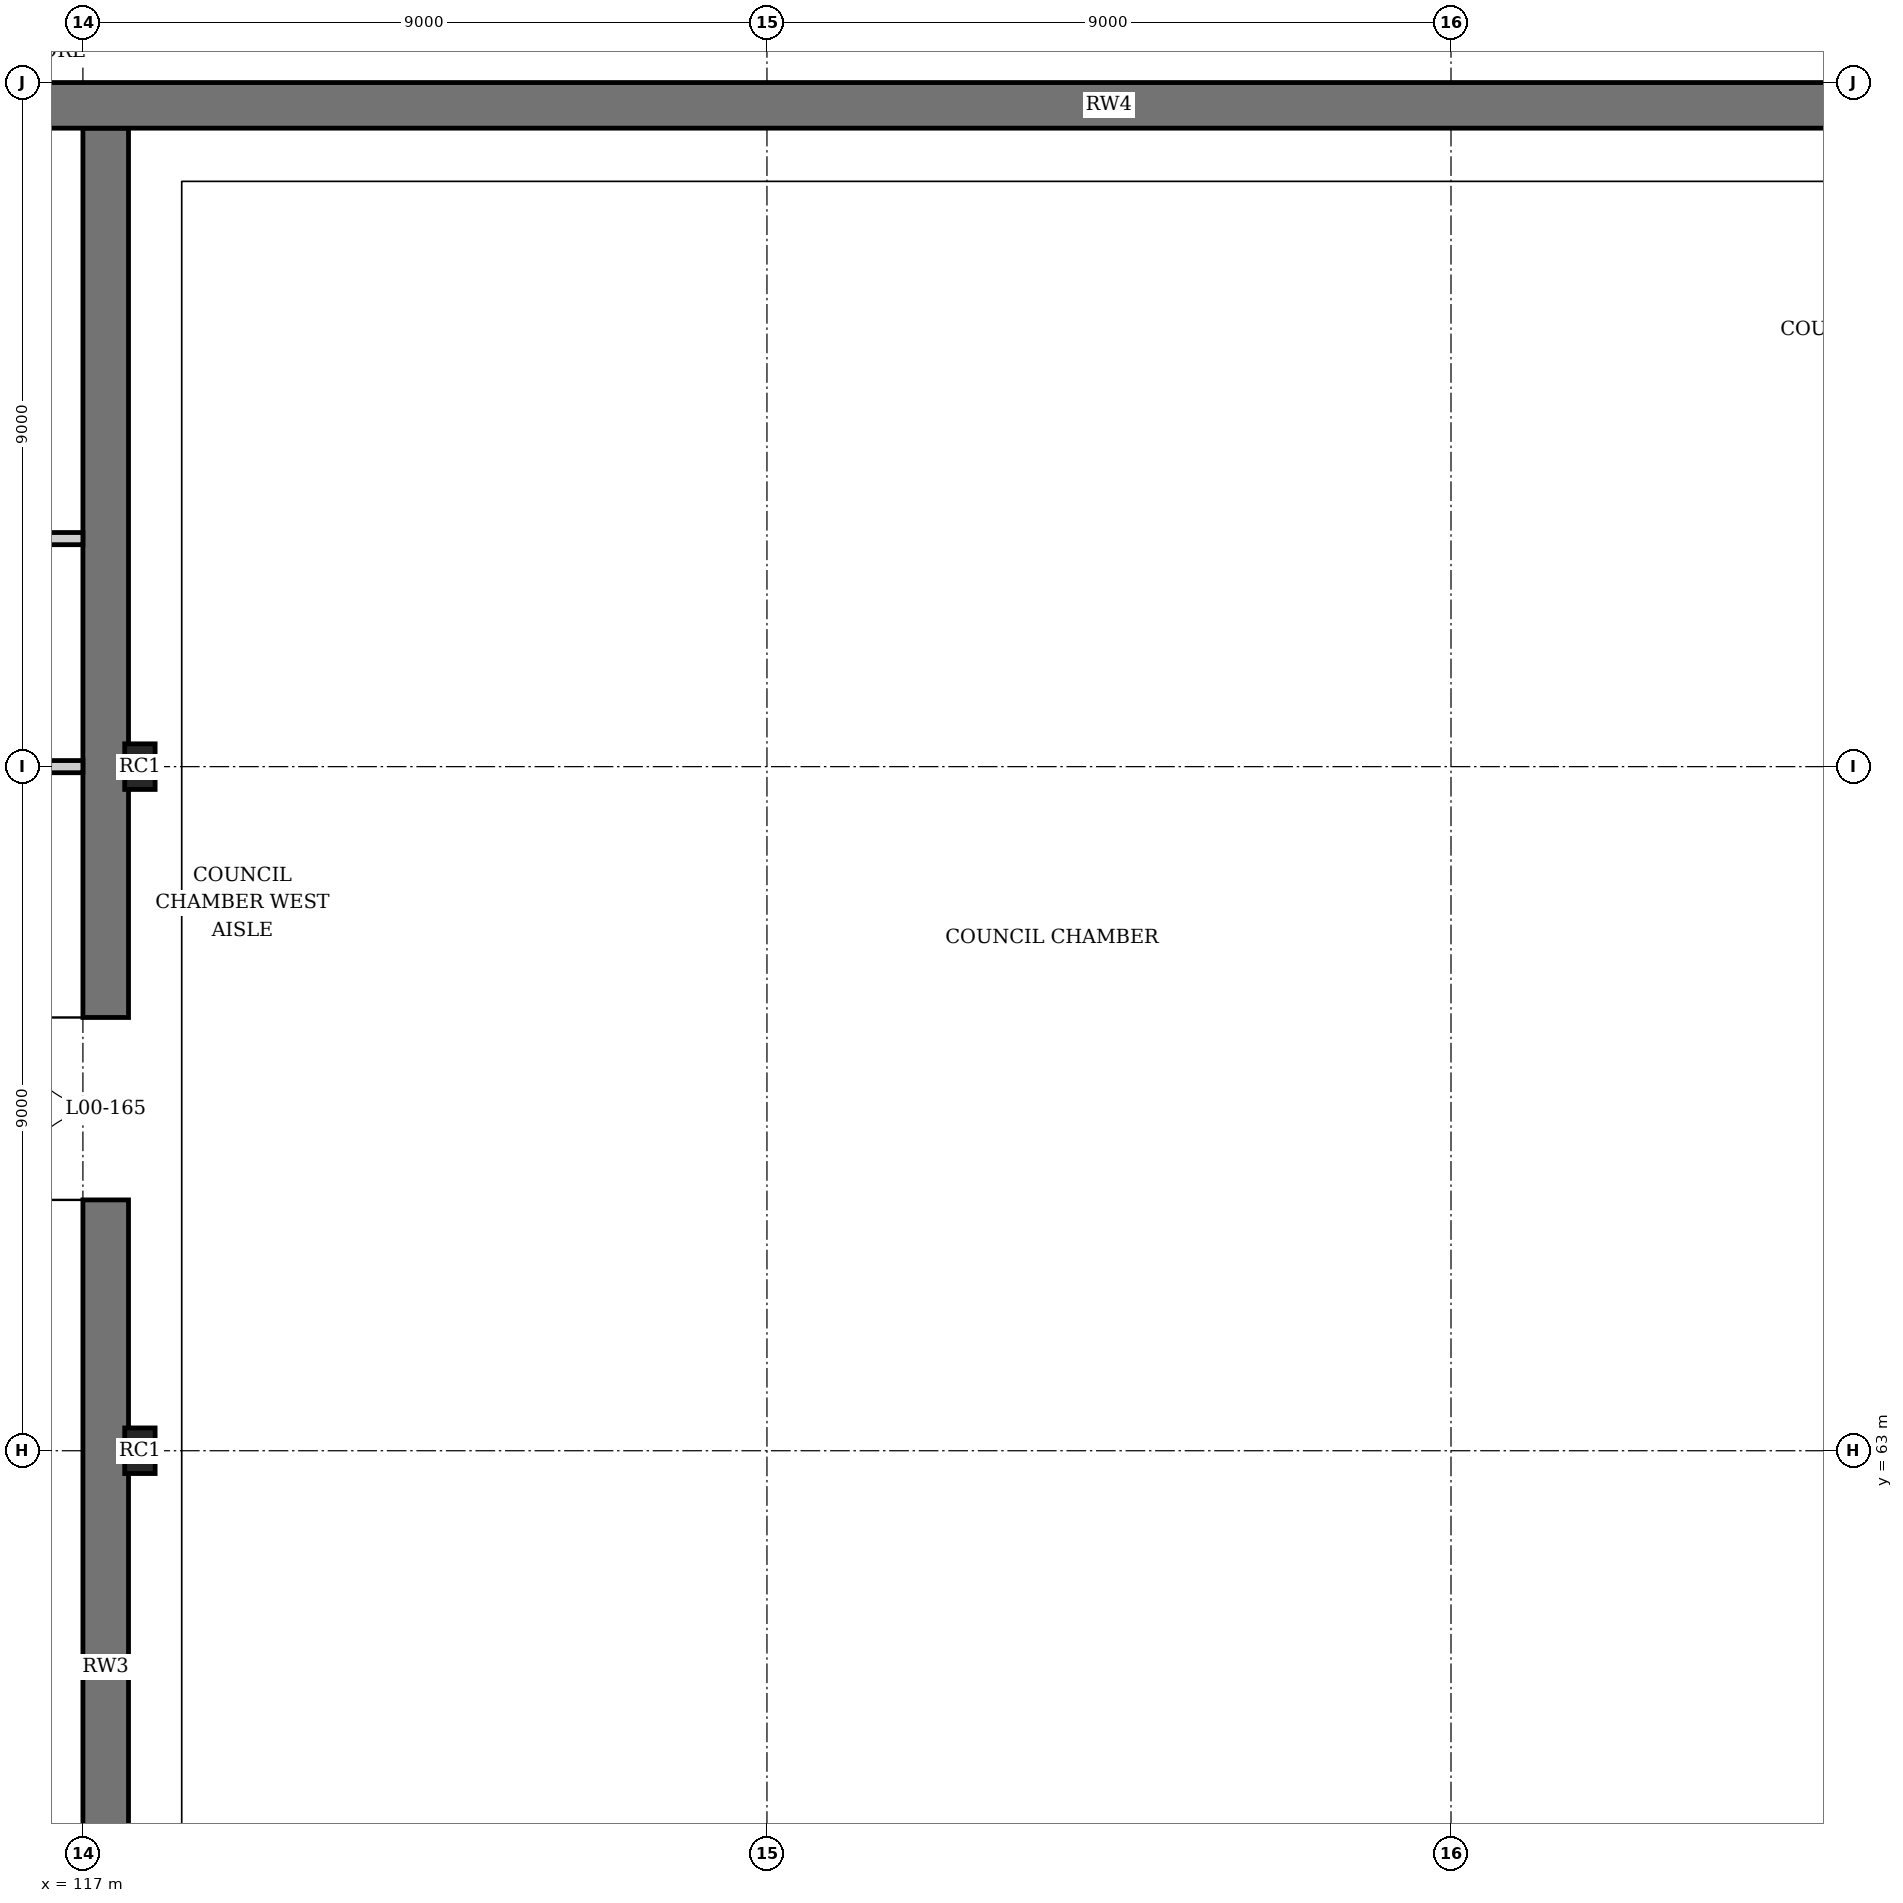
"""IFC4 building model, lengths in metres.
Left out: names, types, materials, properties, quantities, classifications, styles, units other than length and angle.
Written with IfcOpenShell. Run it as: python <this file> out.ifc"""

import sys

from ifc_helpers import new_model, si_unit, direction, frame, frame_2d, origin, origin_2d, place, context, subcontext, project, spatial, rectangle, extrude, element, fill, save


model = new_model("IFC4")
c1 = context("Model", 3, precision=1e-05, world=origin(), true_north=direction((0.0, 1.0)))
c2 = subcontext(c1, "Body", "Model", "MODEL_VIEW")
j1 = project(units=[si_unit("LENGTHUNIT", "METRE"), si_unit("PLANEANGLEUNIT", "RADIAN")], contexts=[c1])
p1 = place(None, origin())
s1 = spatial("IfcSite", under=j1, at=p1, CompositionType="ELEMENT")
p2 = place(p1, origin())
s2 = spatial("IfcBuilding", under=s1, at=p2, CompositionType="ELEMENT")
p3 = place(p2, origin())
s3 = spatial("IfcBuildingStorey", under=s2, at=p3, CompositionType="ELEMENT", Elevation=0.0)
p4 = place(p3, frame((117.3, 54.0, 0.0), z_axis=(0.0, 0.0, 1.0), x_axis=(0.0, 1.0, 0.0)))
e1 = element("IfcWall", 1, at=p4, inside=s3, PredefinedType="SHEAR", context=c2, shape_type="SweptSolid", body=[
    extrude(rectangle(XDim=26.4, YDim=0.6, at=frame_2d((13.2, 0.0))), origin(), (0.0, 0.0, 1.0), 6.0),
])
p5 = place(p4, frame((12.3, 0.0, 0.0)))
e2 = element("IfcOpeningElement", 2, at=p5, cuts=e1, PredefinedType="OPENING", context=c2, shape_type="SweptSolid", body=[
    extrude(rectangle(XDim=2.4, YDim=2.4, at=frame_2d((1.2, 1.2))), frame((0.0, 0.31, 0.0), z_axis=(0.0, -1.0, 0.0), x_axis=(1.0, 0.0, 0.0)), (0.0, 0.0, 1.0), 0.62),
])
for number, where, z_axis, x_axis in (
    (3, (117.75, 63.0, 0.0), (0.0, 0.0, 1.0), (0.0, 1.0, 0.0)),
    (4, (117.75, 72.0, 0.0), (0.0, 0.0, 1.0), (0.0, 1.0, 0.0)),
):
    element("IfcColumn", number, at=place(p3, frame(where, z_axis=z_axis, x_axis=x_axis)), inside=s3, PredefinedType="PILASTER", context=c2, shape_type="SweptSolid", body=[
        extrude(rectangle(XDim=0.6, YDim=0.4, at=origin_2d()), origin(), (0.0, 0.0, 1.0), 6.0),
    ])
p6 = place(p3, frame((0.0, 80.7, 0.0), z_axis=(0.0, 0.0, 1.0), x_axis=(1.0, 0.0, 0.0)))
e5 = element("IfcWall", 5, at=p6, inside=s3, PredefinedType="SHEAR", context=c2, shape_type="SweptSolid", body=[
    extrude(rectangle(XDim=180.0, YDim=0.6, at=frame_2d((90.0, 0.0))), origin(), (0.0, 0.0, 1.0), 6.0),
])
p7 = place(p6, frame((28.25, 0.0, 0.0)))
e6 = element("IfcOpeningElement", 6, at=p7, cuts=e5, PredefinedType="OPENING", context=c2, shape_type="SweptSolid", body=[
    extrude(rectangle(XDim=1.8, YDim=2.4, at=frame_2d((0.9, 1.2))), frame((0.0, 0.31, 0.0), z_axis=(0.0, -1.0, 0.0), x_axis=(1.0, 0.0, 0.0)), (0.0, 0.0, 1.0), 0.62),
])
p8 = place(p6, frame((82.25, 0.0, 0.0)))
e7 = element("IfcOpeningElement", 7, at=p8, cuts=e5, PredefinedType="OPENING", context=c2, shape_type="SweptSolid", body=[
    extrude(rectangle(XDim=1.8, YDim=2.4, at=frame_2d((0.9, 1.2))), frame((0.0, 0.31, 0.0), z_axis=(0.0, -1.0, 0.0), x_axis=(1.0, 0.0, 0.0)), (0.0, 0.0, 1.0), 0.62),
])
p9 = place(p6, frame((90.75, 0.0, 0.0)))
e8 = element("IfcOpeningElement", 8, at=p9, cuts=e5, PredefinedType="OPENING", context=c2, shape_type="SweptSolid", body=[
    extrude(rectangle(XDim=3.0, YDim=3.0, at=frame_2d((1.5, 1.5))), frame((0.0, 0.31, 0.0), z_axis=(0.0, -1.0, 0.0), x_axis=(1.0, 0.0, 0.0)), (0.0, 0.0, 1.0), 0.62),
])
p10 = place(p6, frame((95.25, 0.0, 0.0)))
e9 = element("IfcOpeningElement", 9, at=p10, cuts=e5, PredefinedType="OPENING", context=c2, shape_type="SweptSolid", body=[
    extrude(rectangle(XDim=3.0, YDim=3.0, at=frame_2d((1.5, 1.5))), frame((0.0, 0.31, 0.0), z_axis=(0.0, -1.0, 0.0), x_axis=(1.0, 0.0, 0.0)), (0.0, 0.0, 1.0), 0.62),
])
p11 = place(p6, frame((1.35, 0.0, 0.9)))
e10 = element("IfcOpeningElement", 10, at=p11, cuts=e5, PredefinedType="OPENING", context=c2, shape_type="SweptSolid", body=[
    extrude(rectangle(XDim=1.8, YDim=1.5, at=frame_2d((0.9, 0.75))), frame((0.0, 0.31, 0.0), z_axis=(0.0, -1.0, 0.0), x_axis=(1.0, 0.0, 0.0)), (0.0, 0.0, 1.0), 0.62),
])
p12 = place(p6, frame((5.85, 0.0, 0.9)))
e11 = element("IfcOpeningElement", 11, at=p12, cuts=e5, PredefinedType="OPENING", context=c2, shape_type="SweptSolid", body=[
    extrude(rectangle(XDim=1.8, YDim=1.5, at=frame_2d((0.9, 0.75))), frame((0.0, 0.31, 0.0), z_axis=(0.0, -1.0, 0.0), x_axis=(1.0, 0.0, 0.0)), (0.0, 0.0, 1.0), 0.62),
])
p13 = place(p6, frame((10.35, 0.0, 0.9)))
e12 = element("IfcOpeningElement", 12, at=p13, cuts=e5, PredefinedType="OPENING", context=c2, shape_type="SweptSolid", body=[
    extrude(rectangle(XDim=1.8, YDim=1.5, at=frame_2d((0.9, 0.75))), frame((0.0, 0.31, 0.0), z_axis=(0.0, -1.0, 0.0), x_axis=(1.0, 0.0, 0.0)), (0.0, 0.0, 1.0), 0.62),
])
p14 = place(p6, frame((14.85, 0.0, 0.9)))
e13 = element("IfcOpeningElement", 13, at=p14, cuts=e5, PredefinedType="OPENING", context=c2, shape_type="SweptSolid", body=[
    extrude(rectangle(XDim=1.8, YDim=1.5, at=frame_2d((0.9, 0.75))), frame((0.0, 0.31, 0.0), z_axis=(0.0, -1.0, 0.0), x_axis=(1.0, 0.0, 0.0)), (0.0, 0.0, 1.0), 0.62),
])
p15 = place(p6, frame((19.65, 0.0, 1.2)))
e14 = element("IfcOpeningElement", 14, at=p15, cuts=e5, PredefinedType="OPENING", context=c2, shape_type="SweptSolid", body=[
    extrude(rectangle(XDim=1.2, YDim=1.2, at=frame_2d((0.6, 0.6))), frame((0.0, 0.31, 0.0), z_axis=(0.0, -1.0, 0.0), x_axis=(1.0, 0.0, 0.0)), (0.0, 0.0, 1.0), 0.62),
])
p16 = place(p6, frame((24.15, 0.0, 1.2)))
e15 = element("IfcOpeningElement", 15, at=p16, cuts=e5, PredefinedType="OPENING", context=c2, shape_type="SweptSolid", body=[
    extrude(rectangle(XDim=1.2, YDim=1.2, at=frame_2d((0.6, 0.6))), frame((0.0, 0.31, 0.0), z_axis=(0.0, -1.0, 0.0), x_axis=(1.0, 0.0, 0.0)), (0.0, 0.0, 1.0), 0.62),
])
p17 = place(p6, frame((37.35, 0.0, 0.9)))
e16 = element("IfcOpeningElement", 16, at=p17, cuts=e5, PredefinedType="OPENING", context=c2, shape_type="SweptSolid", body=[
    extrude(rectangle(XDim=1.8, YDim=1.5, at=frame_2d((0.9, 0.75))), frame((0.0, 0.31, 0.0), z_axis=(0.0, -1.0, 0.0), x_axis=(1.0, 0.0, 0.0)), (0.0, 0.0, 1.0), 0.62),
])
p18 = place(p6, frame((41.85, 0.0, 0.9)))
e17 = element("IfcOpeningElement", 17, at=p18, cuts=e5, PredefinedType="OPENING", context=c2, shape_type="SweptSolid", body=[
    extrude(rectangle(XDim=1.8, YDim=1.5, at=frame_2d((0.9, 0.75))), frame((0.0, 0.31, 0.0), z_axis=(0.0, -1.0, 0.0), x_axis=(1.0, 0.0, 0.0)), (0.0, 0.0, 1.0), 0.62),
])
p19 = place(p6, frame((46.35, 0.0, 0.9)))
e18 = element("IfcOpeningElement", 18, at=p19, cuts=e5, PredefinedType="OPENING", context=c2, shape_type="SweptSolid", body=[
    extrude(rectangle(XDim=1.8, YDim=1.5, at=frame_2d((0.9, 0.75))), frame((0.0, 0.31, 0.0), z_axis=(0.0, -1.0, 0.0), x_axis=(1.0, 0.0, 0.0)), (0.0, 0.0, 1.0), 0.62),
])
p20 = place(p6, frame((50.85, 0.0, 0.9)))
e19 = element("IfcOpeningElement", 19, at=p20, cuts=e5, PredefinedType="OPENING", context=c2, shape_type="SweptSolid", body=[
    extrude(rectangle(XDim=1.8, YDim=1.5, at=frame_2d((0.9, 0.75))), frame((0.0, 0.31, 0.0), z_axis=(0.0, -1.0, 0.0), x_axis=(1.0, 0.0, 0.0)), (0.0, 0.0, 1.0), 0.62),
])
p21 = place(p6, frame((55.35, 0.0, 0.9)))
e20 = element("IfcOpeningElement", 20, at=p21, cuts=e5, PredefinedType="OPENING", context=c2, shape_type="SweptSolid", body=[
    extrude(rectangle(XDim=1.8, YDim=1.5, at=frame_2d((0.9, 0.75))), frame((0.0, 0.31, 0.0), z_axis=(0.0, -1.0, 0.0), x_axis=(1.0, 0.0, 0.0)), (0.0, 0.0, 1.0), 0.62),
])
p22 = place(p6, frame((59.85, 0.0, 0.9)))
e21 = element("IfcOpeningElement", 21, at=p22, cuts=e5, PredefinedType="OPENING", context=c2, shape_type="SweptSolid", body=[
    extrude(rectangle(XDim=1.8, YDim=1.5, at=frame_2d((0.9, 0.75))), frame((0.0, 0.31, 0.0), z_axis=(0.0, -1.0, 0.0), x_axis=(1.0, 0.0, 0.0)), (0.0, 0.0, 1.0), 0.62),
])
p23 = place(p6, frame((64.35, 0.0, 0.9)))
e22 = element("IfcOpeningElement", 22, at=p23, cuts=e5, PredefinedType="OPENING", context=c2, shape_type="SweptSolid", body=[
    extrude(rectangle(XDim=1.8, YDim=1.5, at=frame_2d((0.9, 0.75))), frame((0.0, 0.31, 0.0), z_axis=(0.0, -1.0, 0.0), x_axis=(1.0, 0.0, 0.0)), (0.0, 0.0, 1.0), 0.62),
])
p24 = place(p6, frame((68.85, 0.0, 0.9)))
e23 = element("IfcOpeningElement", 23, at=p24, cuts=e5, PredefinedType="OPENING", context=c2, shape_type="SweptSolid", body=[
    extrude(rectangle(XDim=1.8, YDim=1.5, at=frame_2d((0.9, 0.75))), frame((0.0, 0.31, 0.0), z_axis=(0.0, -1.0, 0.0), x_axis=(1.0, 0.0, 0.0)), (0.0, 0.0, 1.0), 0.62),
])
p25 = place(p6, frame((73.35, 0.0, 0.9)))
e24 = element("IfcOpeningElement", 24, at=p25, cuts=e5, PredefinedType="OPENING", context=c2, shape_type="SweptSolid", body=[
    extrude(rectangle(XDim=1.8, YDim=1.5, at=frame_2d((0.9, 0.75))), frame((0.0, 0.31, 0.0), z_axis=(0.0, -1.0, 0.0), x_axis=(1.0, 0.0, 0.0)), (0.0, 0.0, 1.0), 0.62),
])
p26 = place(p6, frame((77.85, 0.0, 0.9)))
e25 = element("IfcOpeningElement", 25, at=p26, cuts=e5, PredefinedType="OPENING", context=c2, shape_type="SweptSolid", body=[
    extrude(rectangle(XDim=1.8, YDim=1.5, at=frame_2d((0.9, 0.75))), frame((0.0, 0.31, 0.0), z_axis=(0.0, -1.0, 0.0), x_axis=(1.0, 0.0, 0.0)), (0.0, 0.0, 1.0), 0.62),
])
p27 = place(p6, frame((100.8, 0.0, 1.7)))
e26 = element("IfcOpeningElement", 26, at=p27, cuts=e5, PredefinedType="OPENING", context=c2, shape_type="SweptSolid", body=[
    extrude(rectangle(XDim=0.9, YDim=0.6, at=frame_2d((0.45, 0.3))), frame((0.0, 0.31, 0.0), z_axis=(0.0, -1.0, 0.0), x_axis=(1.0, 0.0, 0.0)), (0.0, 0.0, 1.0), 0.62),
])
p28 = place(p6, frame((105.3, 0.0, 1.7)))
e27 = element("IfcOpeningElement", 27, at=p28, cuts=e5, PredefinedType="OPENING", context=c2, shape_type="SweptSolid", body=[
    extrude(rectangle(XDim=0.9, YDim=0.6, at=frame_2d((0.45, 0.3))), frame((0.0, 0.31, 0.0), z_axis=(0.0, -1.0, 0.0), x_axis=(1.0, 0.0, 0.0)), (0.0, 0.0, 1.0), 0.62),
])
p29 = place(p6, frame((109.8, 0.0, 1.7)))
e28 = element("IfcOpeningElement", 28, at=p29, cuts=e5, PredefinedType="OPENING", context=c2, shape_type="SweptSolid", body=[
    extrude(rectangle(XDim=0.9, YDim=0.6, at=frame_2d((0.45, 0.3))), frame((0.0, 0.31, 0.0), z_axis=(0.0, -1.0, 0.0), x_axis=(1.0, 0.0, 0.0)), (0.0, 0.0, 1.0), 0.62),
])
p30 = place(p6, frame((154.65, 0.0, 1.2)))
e29 = element("IfcOpeningElement", 29, at=p30, cuts=e5, PredefinedType="OPENING", context=c2, shape_type="SweptSolid", body=[
    extrude(rectangle(XDim=1.2, YDim=1.2, at=frame_2d((0.6, 0.6))), frame((0.0, 0.31, 0.0), z_axis=(0.0, -1.0, 0.0), x_axis=(1.0, 0.0, 0.0)), (0.0, 0.0, 1.0), 0.62),
])
p31 = place(p6, frame((159.15, 0.0, 1.2)))
e30 = element("IfcOpeningElement", 30, at=p31, cuts=e5, PredefinedType="OPENING", context=c2, shape_type="SweptSolid", body=[
    extrude(rectangle(XDim=1.2, YDim=1.2, at=frame_2d((0.6, 0.6))), frame((0.0, 0.31, 0.0), z_axis=(0.0, -1.0, 0.0), x_axis=(1.0, 0.0, 0.0)), (0.0, 0.0, 1.0), 0.62),
])
p32 = place(p6, frame((163.8, 0.0, 1.7)))
e31 = element("IfcOpeningElement", 31, at=p32, cuts=e5, PredefinedType="OPENING", context=c2, shape_type="SweptSolid", body=[
    extrude(rectangle(XDim=0.9, YDim=0.6, at=frame_2d((0.45, 0.3))), frame((0.0, 0.31, 0.0), z_axis=(0.0, -1.0, 0.0), x_axis=(1.0, 0.0, 0.0)), (0.0, 0.0, 1.0), 0.62),
])
p33 = place(p6, frame((168.3, 0.0, 1.7)))
e32 = element("IfcOpeningElement", 32, at=p33, cuts=e5, PredefinedType="OPENING", context=c2, shape_type="SweptSolid", body=[
    extrude(rectangle(XDim=0.9, YDim=0.6, at=frame_2d((0.45, 0.3))), frame((0.0, 0.31, 0.0), z_axis=(0.0, -1.0, 0.0), x_axis=(1.0, 0.0, 0.0)), (0.0, 0.0, 1.0), 0.62),
])
p34 = place(p6, frame((107.55, 0.0, 1.7)))
e33 = element("IfcOpeningElement", 33, at=p34, cuts=e5, PredefinedType="OPENING", context=c2, shape_type="SweptSolid", body=[
    extrude(rectangle(XDim=0.9, YDim=0.6, at=frame_2d((0.45, 0.3))), frame((0.0, 0.31, 0.0), z_axis=(0.0, -1.0, 0.0), x_axis=(1.0, 0.0, 0.0)), (0.0, 0.0, 1.0), 0.62),
])
p35 = place(p6, frame((112.3, 0.0, 1.7)))
e34 = element("IfcOpeningElement", 34, at=p35, cuts=e5, PredefinedType="OPENING", context=c2, shape_type="SweptSolid", body=[
    extrude(rectangle(XDim=0.9, YDim=0.6, at=frame_2d((0.45, 0.3))), frame((0.0, 0.31, 0.0), z_axis=(0.0, -1.0, 0.0), x_axis=(1.0, 0.0, 0.0)), (0.0, 0.0, 1.0), 0.62),
])
p36 = place(p6, frame((166.05, 0.0, 1.7)))
e35 = element("IfcOpeningElement", 35, at=p36, cuts=e5, PredefinedType="OPENING", context=c2, shape_type="SweptSolid", body=[
    extrude(rectangle(XDim=0.9, YDim=0.6, at=frame_2d((0.45, 0.3))), frame((0.0, 0.31, 0.0), z_axis=(0.0, -1.0, 0.0), x_axis=(1.0, 0.0, 0.0)), (0.0, 0.0, 1.0), 0.62),
])
p37 = place(p3, frame((108.164, 72.0, 0.0), z_axis=(0.0, 0.0, 1.0), x_axis=(1.0, 0.0, 0.0)))
e36 = element("IfcWall", 36, at=p37, inside=s3, PredefinedType="PARTITIONING", context=c2, shape_type="SweptSolid", body=[
    extrude(rectangle(XDim=8.836, YDim=0.16, at=frame_2d((4.418, 0.0))), origin(), (0.0, 0.0, 1.0), 5.322),
])
p38 = place(p3, frame((114.58, 75.0, 0.0), z_axis=(0.0, 0.0, 1.0), x_axis=(1.0, 0.0, 0.0)))
e37 = element("IfcWall", 37, at=p38, inside=s3, PredefinedType="PARTITIONING", context=c2, shape_type="SweptSolid", body=[
    extrude(rectangle(XDim=2.42, YDim=0.16, at=frame_2d((1.21, 0.0))), origin(), (0.0, 0.0, 1.0), 5.85),
])
p39 = place(p38, frame((0.77, 0.0, 0.0)))
e38 = element("IfcOpeningElement", 38, at=p39, cuts=e37, PredefinedType="OPENING", context=c2, shape_type="SweptSolid", body=[
    extrude(rectangle(XDim=0.92, YDim=2.1, at=frame_2d((0.46, 1.05))), frame((0.0, 0.09, 0.0), z_axis=(0.0, -1.0, 0.0), x_axis=(1.0, 0.0, 0.0)), (0.0, 0.0, 1.0), 0.18),
])
p40 = place(p5, origin())
e39 = element("IfcDoor", 39, at=p40, inside=s3, OperationType="DOUBLE_DOOR_SINGLE_SWING", PredefinedType="DOOR", context=c2, shape_type="SweptSolid", body=[
    extrude(rectangle(XDim=2.4, YDim=2.4, at=frame_2d((1.2, 1.2))), frame((0.0, 0.025, 0.0), z_axis=(0.0, -1.0, 0.0), x_axis=(1.0, 0.0, 0.0)), (0.0, 0.0, 1.0), 0.05),
])
fill(e2, e39)
save(model, sys.argv[1])
